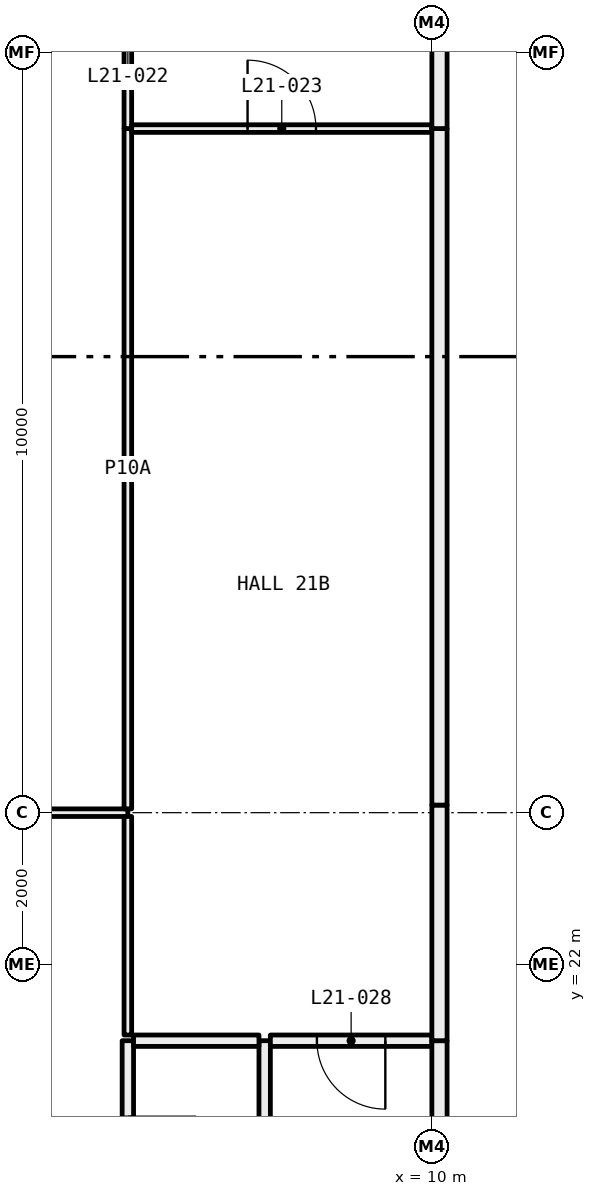
"""IFC4 building model, lengths in metres.
Left out: names, types, materials, properties, quantities, classifications, styles, units other than length and angle.
Written with IfcOpenShell. Run it as: python <this file> out.ifc"""

import sys

from ifc_helpers import new_model, si_unit, direction, frame, frame_2d, origin, place, context, subcontext, project, spatial, rectangle, extrude, element, fill, save


model = new_model("IFC4")
c1 = context("Model", 3, precision=1e-05, world=origin(), true_north=direction((0.0, 1.0)))
c2 = subcontext(c1, "Body", "Model", "MODEL_VIEW")
j1 = project(units=[si_unit("LENGTHUNIT", "METRE"), si_unit("PLANEANGLEUNIT", "RADIAN")], contexts=[c1])
p1 = place(None, origin())
s1 = spatial("IfcSite", under=j1, at=p1, CompositionType="ELEMENT")
p2 = place(p1, origin())
s2 = spatial("IfcBuilding", under=s1, at=p2, CompositionType="ELEMENT")
p3 = place(p2, frame((0.0, 0.0, 85.2)))
s3 = spatial("IfcBuildingStorey", under=s2, at=p3, CompositionType="ELEMENT", Elevation=85.2)
p4 = place(p3, frame((6.0, 24.0, 0.0), z_axis=(0.0, 0.0, 1.0), x_axis=(-1.0, 0.0, 0.0)))
e1 = element("IfcWall", 1, at=p4, inside=s3, PredefinedType="PARTITIONING", context=c2, shape_type="SweptSolid", body=[
    extrude(rectangle(XDim=5.28, YDim=0.1, at=frame_2d((2.64, 0.0))), origin(), (0.0, 0.0, 1.0), 2.45),
])
p5 = place(p4, frame((2.19, 0.0, 0.0)))
e2 = element("IfcOpeningElement", 2, at=p5, cuts=e1, PredefinedType="OPENING", context=c2, shape_type="SweptSolid", body=[
    extrude(rectangle(XDim=0.9, YDim=2.1, at=frame_2d((0.45, 1.05))), frame((0.0, 0.06, 0.0), z_axis=(0.0, -1.0, 0.0), x_axis=(1.0, 0.0, 0.0)), (0.0, 0.0, 1.0), 0.12),
])
p6 = place(p3, frame((6.0, 18.1, 0.0), z_axis=(0.0, 0.0, 1.0), x_axis=(0.0, 1.0, 0.0)))
e3 = element("IfcWall", 3, at=p6, inside=s3, PredefinedType="PARTITIONING", context=c2, shape_type="SweptSolid", body=[
    extrude(rectangle(XDim=2.9, YDim=0.15, at=frame_2d((1.45, 0.0))), origin(), (0.0, 0.0, 1.0), 3.05),
])
p7 = place(p6, frame((1.0, 0.0, 0.0)))
e4 = element("IfcOpeningElement", 4, at=p7, cuts=e3, PredefinedType="OPENING", context=c2, shape_type="SweptSolid", body=[
    extrude(rectangle(XDim=0.9, YDim=2.1, at=frame_2d((0.45, 1.05))), frame((0.0, 0.085, 0.0), z_axis=(0.0, -1.0, 0.0), x_axis=(1.0, 0.0, 0.0)), (0.0, 0.0, 1.0), 0.17),
])
p8 = place(p3, frame((6.0, 21.075, 0.0), z_axis=(0.0, 0.0, 1.0), x_axis=(0.0, 1.0, 0.0)))
e5 = element("IfcWall", 5, at=p8, inside=s3, PredefinedType="PARTITIONING", context=c2, shape_type="SweptSolid", body=[
    extrude(rectangle(XDim=2.875, YDim=0.1, at=frame_2d((1.438, 0.0))), origin(), (0.0, 0.0, 1.0), 2.45),
])
p9 = place(p3, frame((6.0, 24.05, 0.0), z_axis=(0.0, 0.0, 1.0), x_axis=(0.0, 1.0, 0.0)))
e6 = element("IfcWall", 6, at=p9, inside=s3, PredefinedType="PARTITIONING", context=c2, shape_type="SweptSolid", body=[
    extrude(rectangle(XDim=8.95, YDim=0.1, at=frame_2d((4.475, 0.0))), origin(), (0.0, 0.0, 1.0), 2.45),
])
p10 = place(p3, frame((6.0, 33.0, 0.0), z_axis=(0.0, 0.0, 1.0), x_axis=(0.0, 1.0, 0.0)))
e7 = element("IfcWall", 7, at=p10, inside=s3, PredefinedType="PARTITIONING", context=c2, shape_type="SweptSolid", body=[
    extrude(rectangle(XDim=2.95, YDim=0.1, at=frame_2d((1.475, 0.0))), origin(), (0.0, 0.0, 1.0), 2.45),
])
p11 = place(p10, frame((1.025, 0.0, 0.0)))
e8 = element("IfcOpeningElement", 8, at=p11, cuts=e7, PredefinedType="OPENING", context=c2, shape_type="SweptSolid", body=[
    extrude(rectangle(XDim=0.9, YDim=2.1, at=frame_2d((0.45, 1.05))), frame((0.0, 0.06, 0.0), z_axis=(0.0, -1.0, 0.0), x_axis=(1.0, 0.0, 0.0)), (0.0, 0.0, 1.0), 0.12),
])
p12 = place(p3, frame((7.8, 18.1, 0.0), z_axis=(0.0, 0.0, 1.0), x_axis=(0.0, 1.0, 0.0)))
e9 = element("IfcWall", 9, at=p12, inside=s3, PredefinedType="PARTITIONING", context=c2, shape_type="SweptSolid", body=[
    extrude(rectangle(XDim=2.9, YDim=0.15, at=frame_2d((1.45, 0.0))), origin(), (0.0, 0.0, 1.0), 3.05),
])
p13 = place(p3, frame((7.725, 21.0, 0.0), z_axis=(0.0, 0.0, 1.0), x_axis=(-1.0, 0.0, 0.0)))
e10 = element("IfcWall", 10, at=p13, inside=s3, PredefinedType="PARTITIONING", context=c2, shape_type="SweptSolid", body=[
    extrude(rectangle(XDim=1.65, YDim=0.15, at=frame_2d((0.825, 0.0))), origin(), (0.0, 0.0, 1.0), 3.05),
])
p14 = place(p3, frame((10.0, 21.0, 0.0), z_axis=(0.0, 0.0, 1.0), x_axis=(-1.0, 0.0, 0.0)))
e11 = element("IfcWall", 11, at=p14, inside=s3, PredefinedType="PARTITIONING", context=c2, shape_type="SweptSolid", body=[
    extrude(rectangle(XDim=2.125, YDim=0.15, at=frame_2d((1.062, 0.0))), origin(), (0.0, 0.0, 1.0), 3.05),
])
p15 = place(p14, frame((0.613, 0.0, 0.0)))
e12 = element("IfcOpeningElement", 12, at=p15, cuts=e11, PredefinedType="OPENING", context=c2, shape_type="SweptSolid", body=[
    extrude(rectangle(XDim=0.9, YDim=2.1, at=frame_2d((0.45, 1.05))), frame((0.0, 0.085, 0.0), z_axis=(0.0, -1.0, 0.0), x_axis=(1.0, 0.0, 0.0)), (0.0, 0.0, 1.0), 0.17),
])
p16 = place(p3, frame((10.1, 18.1, 0.0), z_axis=(0.0, 0.0, 1.0), x_axis=(0.0, 1.0, 0.0)))
e13 = element("IfcWall", 13, at=p16, inside=s3, PredefinedType="PARTITIONING", context=c2, shape_type="SweptSolid", body=[
    extrude(rectangle(XDim=2.9, YDim=0.2, at=frame_2d((1.45, 0.0))), origin(), (0.0, 0.0, 1.0), 3.05),
])
p17 = place(p3, frame((10.0, 33.0, 0.0), z_axis=(0.0, 0.0, 1.0), x_axis=(-1.0, 0.0, 0.0)))
e14 = element("IfcWall", 14, at=p17, inside=s3, PredefinedType="PARTITIONING", context=c2, shape_type="SweptSolid", body=[
    extrude(rectangle(XDim=3.95, YDim=0.1, at=frame_2d((1.975, 0.0))), origin(), (0.0, 0.0, 1.0), 3.05),
])
p18 = place(p17, frame((1.525, 0.0, 0.0)))
e15 = element("IfcOpeningElement", 15, at=p18, cuts=e14, PredefinedType="OPENING", context=c2, shape_type="SweptSolid", body=[
    extrude(rectangle(XDim=0.9, YDim=2.1, at=frame_2d((0.45, 1.05))), frame((0.0, 0.06, 0.0), z_axis=(0.0, -1.0, 0.0), x_axis=(1.0, 0.0, 0.0)), (0.0, 0.0, 1.0), 0.12),
])
p19 = place(p3, frame((10.1, 21.0, 0.0), z_axis=(0.0, 0.0, 1.0), x_axis=(0.0, 1.0, 0.0)))
e16 = element("IfcWall", 16, at=p19, inside=s3, PredefinedType="PARTITIONING", context=c2, shape_type="SweptSolid", body=[
    extrude(rectangle(XDim=3.1, YDim=0.2, at=frame_2d((1.55, 0.0))), origin(), (0.0, 0.0, 1.0), 2.45),
])
p20 = place(p3, frame((10.1, 24.1, 0.0), z_axis=(0.0, 0.0, 1.0), x_axis=(0.0, 1.0, 0.0)))
e17 = element("IfcWall", 17, at=p20, inside=s3, PredefinedType="PARTITIONING", context=c2, shape_type="SweptSolid", body=[
    extrude(rectangle(XDim=8.9, YDim=0.2, at=frame_2d((4.45, 0.0))), origin(), (0.0, 0.0, 1.0), 3.05),
])
p21 = place(p3, frame((10.1, 33.0, 0.0), z_axis=(0.0, 0.0, 1.0), x_axis=(0.0, 1.0, 0.0)))
e18 = element("IfcWall", 18, at=p21, inside=s3, PredefinedType="PARTITIONING", context=c2, shape_type="SweptSolid", body=[
    extrude(rectangle(XDim=3.1, YDim=0.2, at=frame_2d((1.55, 0.0))), origin(), (0.0, 0.0, 1.0), 2.45),
])
p22 = place(p21, frame((1.05, 0.0, 0.0)))
e19 = element("IfcOpeningElement", 19, at=p22, cuts=e18, PredefinedType="OPENING", context=c2, shape_type="SweptSolid", body=[
    extrude(rectangle(XDim=1.0, YDim=2.1, at=frame_2d((0.5, 1.05))), frame((0.0, 0.11, 0.0), z_axis=(0.0, -1.0, 0.0), x_axis=(1.0, 0.0, 0.0)), (0.0, 0.0, 1.0), 0.22),
])
p23 = place(p18, frame((0.9, 0.0, 0.0), x_axis=(-1.0, 0.0, 0.0)))
e20 = element("IfcDoor", 20, at=p23, inside=s3, OperationType="SINGLE_SWING_RIGHT", PredefinedType="DOOR", context=c2, shape_type="SweptSolid", body=[
    extrude(rectangle(XDim=0.9, YDim=2.1, at=frame_2d((0.45, 1.05))), frame((0.0, 0.025, 0.0), z_axis=(0.0, -1.0, 0.0), x_axis=(1.0, 0.0, 0.0)), (0.0, 0.0, 1.0), 0.05),
])
fill(e15, e20)
p24 = place(p15, origin())
e21 = element("IfcDoor", 21, at=p24, inside=s3, OperationType="SINGLE_SWING_RIGHT", PredefinedType="DOOR", context=c2, shape_type="SweptSolid", body=[
    extrude(rectangle(XDim=0.9, YDim=2.1, at=frame_2d((0.45, 1.05))), frame((0.0, 0.025, 0.0), z_axis=(0.0, -1.0, 0.0), x_axis=(1.0, 0.0, 0.0)), (0.0, 0.0, 1.0), 0.05),
])
fill(e12, e21)
save(model, sys.argv[1])
